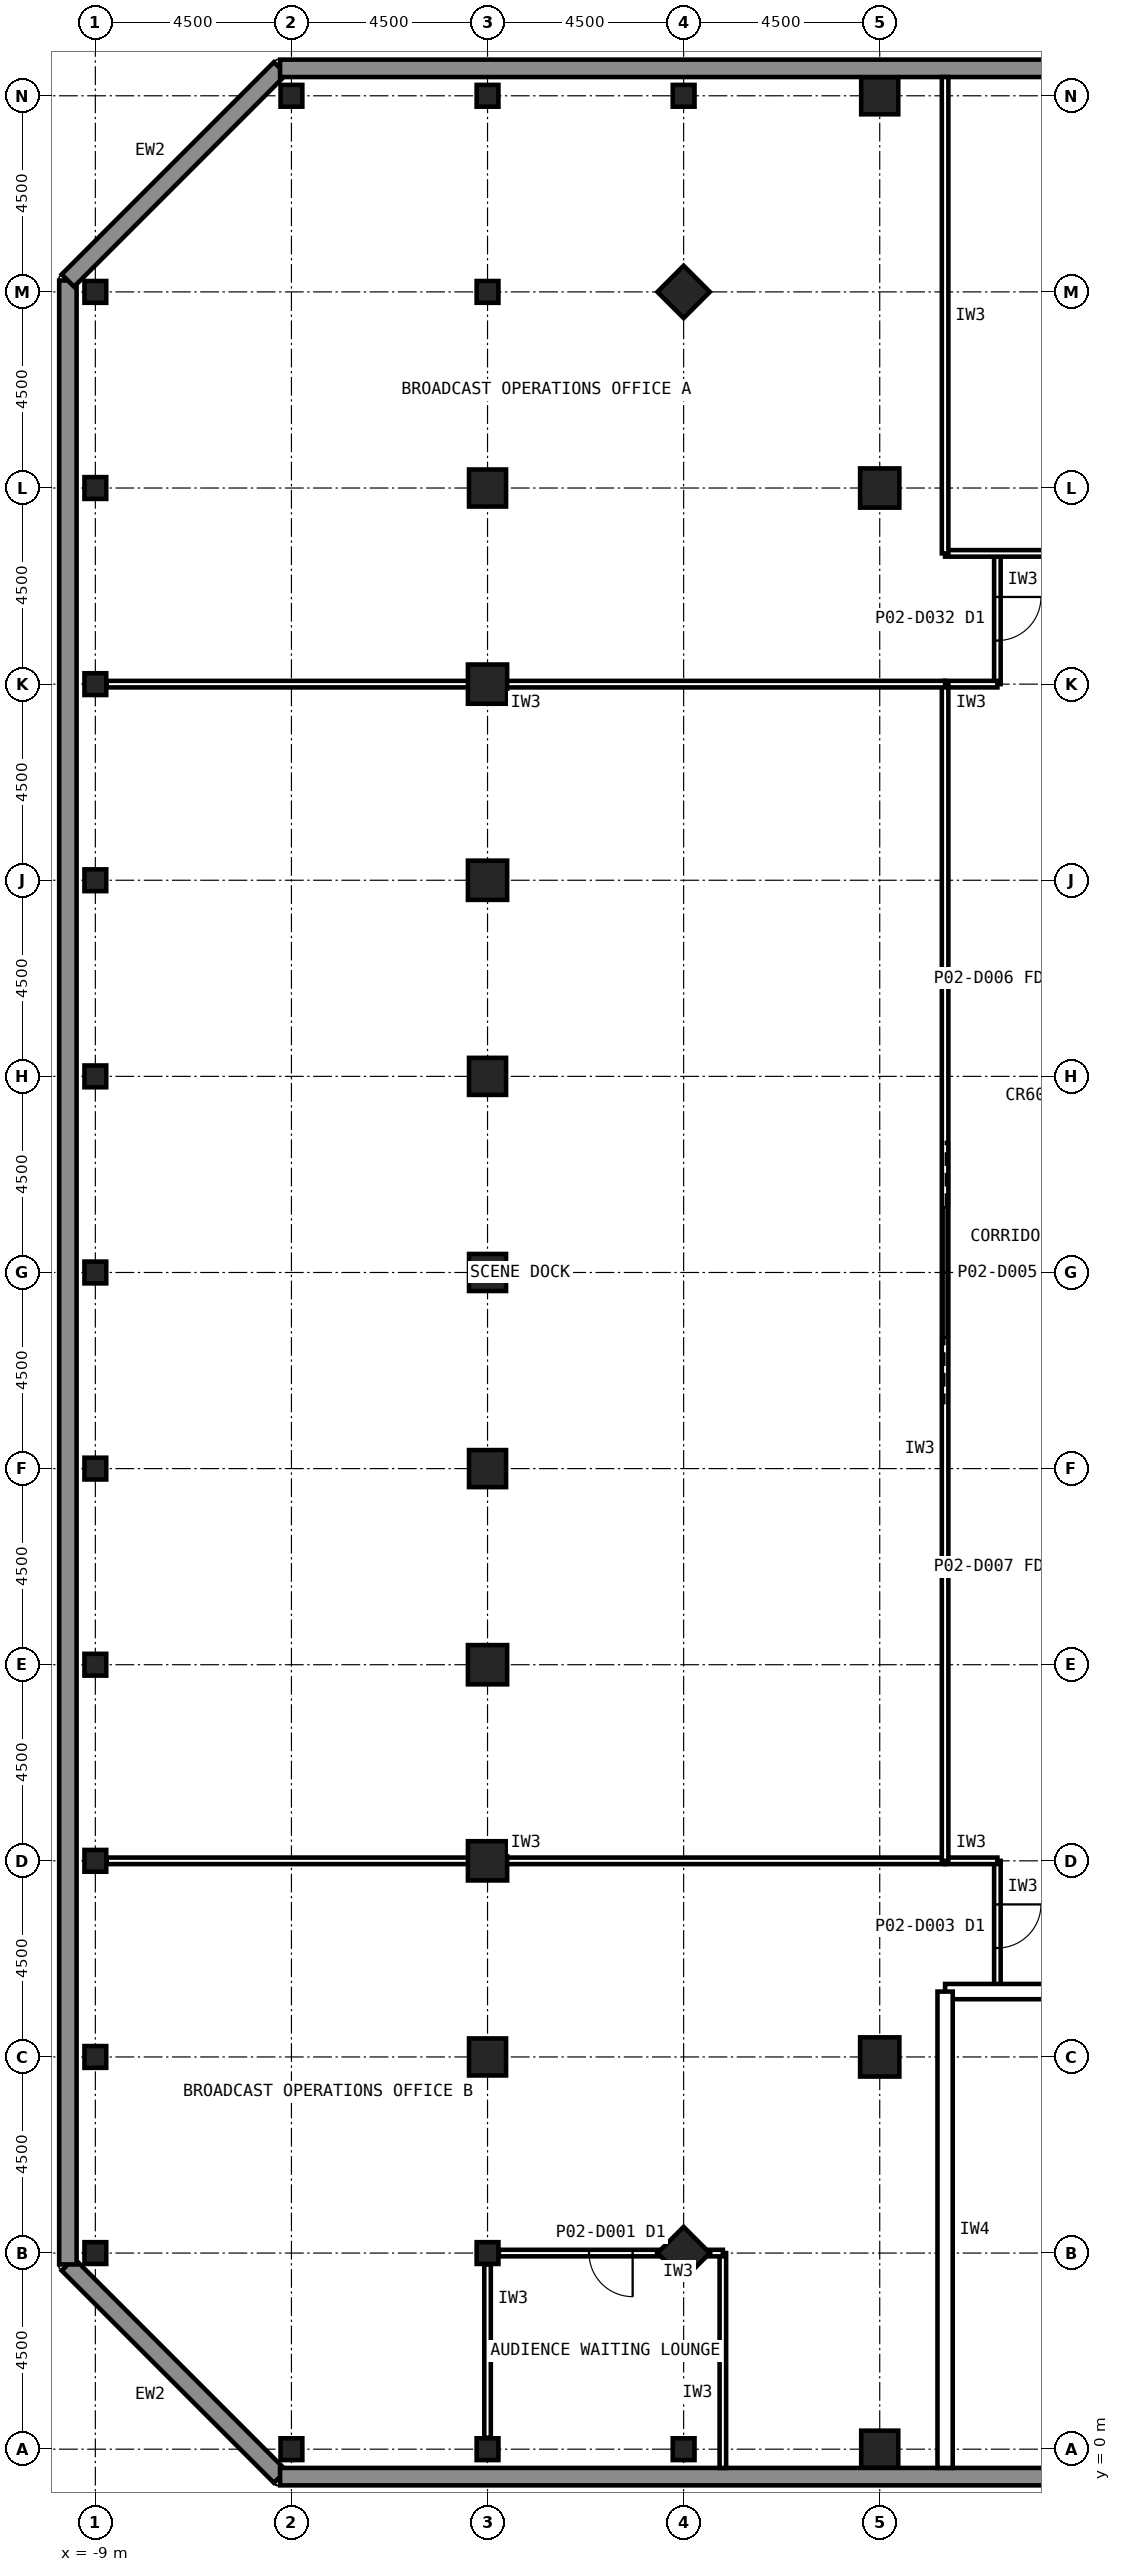
"""IFC4 building model, lengths in metres.
Left out: names, types, materials, properties, quantities, classifications, styles, units other than length and angle.
Written with IfcOpenShell. Run it as: python <this file> out.ifc"""

import sys

from ifc_helpers import new_model, si_unit, direction, frame, frame_2d, origin, origin_2d, place, context, subcontext, project, spatial, rectangle, hollow_rectangle, extrude, element, fill, save


model = new_model("IFC4")
c1 = context("Model", 3, precision=1e-05, world=origin(), true_north=direction((0.0, 1.0)))
c2 = subcontext(c1, "Body", "Model", "MODEL_VIEW")
j1 = project(units=[si_unit("LENGTHUNIT", "METRE"), si_unit("PLANEANGLEUNIT", "RADIAN")], contexts=[c1])
p1 = place(None, origin())
s1 = spatial("IfcSite", under=j1, at=p1, CompositionType="ELEMENT")
p2 = place(p1, origin())
s2 = spatial("IfcBuilding", under=s1, at=p2, CompositionType="ELEMENT")
p3 = place(p2, frame((0.0, 0.0, 6.0)))
s3 = spatial("IfcBuildingStorey", under=s2, at=p3, CompositionType="ELEMENT", Elevation=6.0)
for number, where, z_axis, x_axis in (
    (1, (9.0, 0.0, 0.0), (0.0, 0.0, 1.0), (1.0, 0.0, 0.0)),
    (2, (9.0, 54.0, 0.0), (0.0, 0.0, 1.0), (1.0, 0.0, 0.0)),
    (3, (0.0, 45.0, 0.0), (0.0, 0.0, 1.0), (1.0, 0.0, 0.0)),
):
    element("IfcColumn", number, at=place(p3, frame(where, z_axis=z_axis, x_axis=x_axis)), inside=s3, PredefinedType="COLUMN", context=c2, shape_type="SweptSolid", body=[
        extrude(hollow_rectangle(XDim=0.85, YDim=0.85, WallThickness=0.05, at=origin_2d()), origin(), (0.0, 0.0, 1.0), 6.0),
    ])
for number, where, z_axis, x_axis in (
    (4, (0.0, 40.5, 0.0), (0.0, 0.0, 1.0), (1.0, 0.0, 0.0)),
    (5, (0.0, 36.0, 0.0), (0.0, 0.0, 1.0), (1.0, 0.0, 0.0)),
):
    element("IfcColumn", number, at=place(p3, frame(where, z_axis=z_axis, x_axis=x_axis)), inside=s3, PredefinedType="COLUMN", context=c2, shape_type="SweptSolid", body=[
        extrude(hollow_rectangle(XDim=0.9, YDim=0.9, WallThickness=0.063, at=origin_2d()), origin(), (0.0, 0.0, 1.0), 6.0),
    ])
for number, where, z_axis, x_axis in (
    (6, (0.0, 31.5, 0.0), (0.0, 0.0, 1.0), (1.0, 0.0, 0.0)),
    (7, (0.0, 27.0, 0.0), (0.0, 0.0, 1.0), (1.0, 0.0, 0.0)),
    (8, (0.0, 22.5, 0.0), (0.0, 0.0, 1.0), (1.0, 0.0, 0.0)),
):
    element("IfcColumn", number, at=place(p3, frame(where, z_axis=z_axis, x_axis=x_axis)), inside=s3, PredefinedType="COLUMN", context=c2, shape_type="SweptSolid", body=[
        extrude(hollow_rectangle(XDim=0.85, YDim=0.85, WallThickness=0.05, at=origin_2d()), origin(), (0.0, 0.0, 1.0), 6.0),
    ])
for number, where, z_axis, x_axis in (
    (9, (0.0, 18.0, 0.0), (0.0, 0.0, 1.0), (1.0, 0.0, 0.0)),
    (10, (0.0, 13.5, 0.0), (0.0, 0.0, 1.0), (1.0, 0.0, 0.0)),
):
    element("IfcColumn", number, at=place(p3, frame(where, z_axis=z_axis, x_axis=x_axis)), inside=s3, PredefinedType="COLUMN", context=c2, shape_type="SweptSolid", body=[
        extrude(hollow_rectangle(XDim=0.9, YDim=0.9, WallThickness=0.063, at=origin_2d()), origin(), (0.0, 0.0, 1.0), 6.0),
    ])
for number, where, z_axis, x_axis in (
    (11, (0.0, 9.0, 0.0), (0.0, 0.0, 1.0), (1.0, 0.0, 0.0)),
    (12, (4.5, 4.5, 0.0), (0.0, 0.0, 1.0), (0.707, 0.707, 0.0)),
    (13, (4.5, 49.5, 0.0), (0.0, 0.0, 1.0), (0.707, 0.707, 0.0)),
):
    element("IfcColumn", number, at=place(p3, frame(where, z_axis=z_axis, x_axis=x_axis)), inside=s3, PredefinedType="COLUMN", context=c2, shape_type="SweptSolid", body=[
        extrude(hollow_rectangle(XDim=0.85, YDim=0.85, WallThickness=0.05, at=origin_2d()), origin(), (0.0, 0.0, 1.0), 6.0),
    ])
for number, where, z_axis, x_axis in (
    (14, (9.0, 9.0, 0.0), (0.0, 0.0, 1.0), (1.0, 0.0, 0.0)),
    (15, (9.0, 45.0, 0.0), (0.0, 0.0, 1.0), (1.0, 0.0, 0.0)),
):
    element("IfcColumn", number, at=place(p3, frame(where, z_axis=z_axis, x_axis=x_axis)), inside=s3, PredefinedType="COLUMN", context=c2, shape_type="SweptSolid", body=[
        extrude(hollow_rectangle(XDim=0.9, YDim=0.9, WallThickness=0.063, at=origin_2d()), origin(), (0.0, 0.0, 1.0), 6.0),
    ])
for number, where, z_axis, x_axis in (
    (16, (-9.0, 4.5, 0.0), (0.0, 0.0, 1.0), (1.0, 0.0, 0.0)),
    (17, (-9.0, 9.0, 0.0), (0.0, 0.0, 1.0), (1.0, 0.0, 0.0)),
    (18, (-9.0, 13.5, 0.0), (0.0, 0.0, 1.0), (1.0, 0.0, 0.0)),
    (19, (-9.0, 18.0, 0.0), (0.0, 0.0, 1.0), (1.0, 0.0, 0.0)),
    (20, (-9.0, 22.5, 0.0), (0.0, 0.0, 1.0), (1.0, 0.0, 0.0)),
    (21, (-9.0, 27.0, 0.0), (0.0, 0.0, 1.0), (1.0, 0.0, 0.0)),
    (22, (-9.0, 31.5, 0.0), (0.0, 0.0, 1.0), (1.0, 0.0, 0.0)),
    (23, (-9.0, 36.0, 0.0), (0.0, 0.0, 1.0), (1.0, 0.0, 0.0)),
    (24, (-9.0, 40.5, 0.0), (0.0, 0.0, 1.0), (1.0, 0.0, 0.0)),
    (25, (-9.0, 45.0, 0.0), (0.0, 0.0, 1.0), (1.0, 0.0, 0.0)),
    (26, (-9.0, 49.5, 0.0), (0.0, 0.0, 1.0), (1.0, 0.0, 0.0)),
    (27, (-4.5, 0.0, 0.0), (0.0, 0.0, 1.0), (1.0, 0.0, 0.0)),
    (28, (-4.5, 54.0, 0.0), (0.0, 0.0, 1.0), (1.0, 0.0, 0.0)),
    (29, (0.0, 0.0, 0.0), (0.0, 0.0, 1.0), (1.0, 0.0, 0.0)),
    (30, (4.5, 0.0, 0.0), (0.0, 0.0, 1.0), (1.0, 0.0, 0.0)),
    (31, (0.0, 4.5, 0.0), (0.0, 0.0, 1.0), (1.0, 0.0, 0.0)),
    (32, (0.0, 54.0, 0.0), (0.0, 0.0, 1.0), (1.0, 0.0, 0.0)),
    (33, (4.5, 54.0, 0.0), (0.0, 0.0, 1.0), (1.0, 0.0, 0.0)),
    (34, (0.0, 49.5, 0.0), (0.0, 0.0, 1.0), (1.0, 0.0, 0.0)),
):
    element("IfcColumn", number, at=place(p3, frame(where, z_axis=z_axis, x_axis=x_axis)), inside=s3, PredefinedType="COLUMN", context=c2, shape_type="SweptSolid", body=[
        extrude(hollow_rectangle(XDim=0.5, YDim=0.5, WallThickness=0.022, at=origin_2d()), origin(), (0.0, 0.0, 1.0), 6.0),
    ])
p4 = place(p3, frame((-4.761, -0.63, 0.0), z_axis=(0.0, 0.0, 1.0), x_axis=(-0.707106781187, 0.707106781187, 0.0)))
e35 = element("IfcWall", 35, at=p4, inside=s3, PredefinedType="SOLIDWALL", context=c2, shape_type="SweptSolid", body=[
    extrude(rectangle(XDim=6.886, YDim=0.4, at=frame_2d((3.443, 0.0))), origin(), (0.0, 0.0, 1.0), 6.0),
])
p5 = place(p3, frame((-9.63, 4.239, 0.0), z_axis=(0.0, 0.0, 1.0), x_axis=(0.0, 1.0, 0.0)))
e36 = element("IfcWall", 36, at=p5, inside=s3, PredefinedType="SOLIDWALL", context=c2, shape_type="SweptSolid", body=[
    extrude(rectangle(XDim=45.522, YDim=0.4, at=frame_2d((22.761, 0.0))), origin(), (0.0, 0.0, 1.0), 6.0),
])
p6 = place(p3, frame((-9.63, 49.761, 0.0), z_axis=(0.0, 0.0, 1.0), x_axis=(0.707106781187, 0.707106781187, 0.0)))
e37 = element("IfcWall", 37, at=p6, inside=s3, PredefinedType="SOLIDWALL", context=c2, shape_type="SweptSolid", body=[
    extrude(rectangle(XDim=6.886, YDim=0.4, at=frame_2d((3.443, 0.0))), origin(), (0.0, 0.0, 1.0), 6.0),
])
for number, where, z_axis, x_axis in (
    (38, (-4.761, 54.63, 0.0), (0.0, 0.0, 1.0), (1.0, 0.0, 0.0)),
    (39, (58.761, -0.63, 0.0), (0.0, 0.0, 1.0), (-1.0, 0.0, 0.0)),
):
    element("IfcWall", number, at=place(p3, frame(where, z_axis=z_axis, x_axis=x_axis)), inside=s3, PredefinedType="SOLIDWALL", context=c2, shape_type="SweptSolid", body=[
        extrude(rectangle(XDim=63.522, YDim=0.4, at=frame_2d((31.761, 0.0))), origin(), (0.0, 0.0, 1.0), 6.0),
    ])
p7 = place(p3, frame((11.7, 43.5, 0.0), z_axis=(0.0, 0.0, 1.0), x_axis=(0.0, -1.0, 0.0)))
e40 = element("IfcWall", 40, at=p7, inside=s3, PredefinedType="PARTITIONING", context=c2, shape_type="SweptSolid", body=[
    extrude(rectangle(XDim=3.0, YDim=0.15, at=frame_2d((1.5, 0.0))), origin(), (0.0, 0.0, 1.0), 5.8),
])
p8 = place(p7, frame((1.0, 0.0, 0.0)))
e41 = element("IfcOpeningElement", 41, at=p8, cuts=e40, PredefinedType="OPENING", context=c2, shape_type="SweptSolid", body=[
    extrude(rectangle(XDim=1.0, YDim=2.1, at=frame_2d((0.5, 1.05))), frame((0.0, 0.085, 0.0), z_axis=(0.0, -1.0, 0.0), x_axis=(1.0, 0.0, 0.0)), (0.0, 0.0, 1.0), 0.17),
])
p9 = place(p3, frame((11.7, 40.5, 0.0), z_axis=(0.0, 0.0, 1.0), x_axis=(-1.0, 0.0, 0.0)))
e42 = element("IfcWall", 42, at=p9, inside=s3, PredefinedType="PARTITIONING", context=c2, shape_type="SweptSolid", body=[
    extrude(rectangle(XDim=1.21, YDim=0.15, at=frame_2d((0.605, 0.0))), origin(), (0.0, 0.0, 1.0), 4.881),
])
p10 = place(p3, frame((11.7, 13.5, 0.0), z_axis=(0.0, 0.0, 1.0), x_axis=(0.0, -1.0, 0.0)))
e43 = element("IfcWall", 43, at=p10, inside=s3, PredefinedType="PARTITIONING", context=c2, shape_type="SweptSolid", body=[
    extrude(rectangle(XDim=3.0, YDim=0.15, at=frame_2d((1.5, 0.0))), origin(), (0.0, 0.0, 1.0), 5.8),
])
p11 = place(p10, frame((1.0, 0.0, 0.0)))
e44 = element("IfcOpeningElement", 44, at=p11, cuts=e43, PredefinedType="OPENING", context=c2, shape_type="SweptSolid", body=[
    extrude(rectangle(XDim=1.0, YDim=2.1, at=frame_2d((0.5, 1.05))), frame((0.0, 0.085, 0.0), z_axis=(0.0, -1.0, 0.0), x_axis=(1.0, 0.0, 0.0)), (0.0, 0.0, 1.0), 0.17),
])
p12 = place(p3, frame((10.49, 13.5, 0.0), z_axis=(0.0, 0.0, 1.0), x_axis=(1.0, 0.0, 0.0)))
e45 = element("IfcWall", 45, at=p12, inside=s3, PredefinedType="PARTITIONING", context=c2, shape_type="SweptSolid", body=[
    extrude(rectangle(XDim=1.21, YDim=0.15, at=frame_2d((0.605, 0.0))), origin(), (0.0, 0.0, 1.0), 4.881),
])
p13 = place(p3, frame((43.5, 10.5, 0.0), z_axis=(0.0, 0.0, 1.0), x_axis=(-1.0, 0.0, 0.0)))
e46 = element("IfcWall", 46, at=p13, inside=s3, PredefinedType="PARTITIONING", context=c2, shape_type="SweptSolid", body=[
    extrude(rectangle(XDim=33.0, YDim=0.35, at=frame_2d((16.5, 0.0))), origin(), (0.0, 0.0, 1.0), 5.8),
])
p14 = place(p13, frame((15.3, 0.0, 0.0)))
e47 = element("IfcOpeningElement", 47, at=p14, cuts=e46, PredefinedType="OPENING", context=c2, shape_type="SweptSolid", body=[
    extrude(rectangle(XDim=2.4, YDim=3.0, at=frame_2d((1.2, 1.5))), frame((0.0, 0.185, 0.0), z_axis=(0.0, -1.0, 0.0), x_axis=(1.0, 0.0, 0.0)), (0.0, 0.0, 1.0), 0.37),
])
p15 = place(p3, frame((10.5, 10.5, 0.0), z_axis=(0.0, 0.0, 1.0), x_axis=(0.0, -1.0, 0.0)))
e48 = element("IfcWall", 48, at=p15, inside=s3, PredefinedType="PARTITIONING", context=c2, shape_type="SweptSolid", body=[
    extrude(rectangle(XDim=10.93, YDim=0.35, at=frame_2d((5.465, 0.0))), origin(), (0.0, 0.0, 1.0), 5.8),
])
p16 = place(p3, frame((10.5, 43.5, 0.0), z_axis=(0.0, 0.0, 1.0), x_axis=(1.0, 0.0, 0.0)))
e49 = element("IfcWall", 49, at=p16, inside=s3, PredefinedType="PARTITIONING", context=c2, shape_type="SweptSolid", body=[
    extrude(rectangle(XDim=33.0, YDim=0.15, at=frame_2d((16.5, 0.0))), origin(), (0.0, 0.0, 1.0), 5.8),
])
p17 = place(p16, frame((16.0, 0.0, 0.0)))
e50 = element("IfcOpeningElement", 50, at=p17, cuts=e49, PredefinedType="OPENING", context=c2, shape_type="SweptSolid", body=[
    extrude(rectangle(XDim=1.0, YDim=2.1, at=frame_2d((0.5, 1.05))), frame((0.0, 0.085, 0.0), z_axis=(0.0, -1.0, 0.0), x_axis=(1.0, 0.0, 0.0)), (0.0, 0.0, 1.0), 0.17),
])
p18 = place(p3, frame((10.5, 54.43, 0.0), z_axis=(0.0, 0.0, 1.0), x_axis=(0.0, -1.0, 0.0)))
e51 = element("IfcWall", 51, at=p18, inside=s3, PredefinedType="PARTITIONING", context=c2, shape_type="SweptSolid", body=[
    extrude(rectangle(XDim=10.93, YDim=0.15, at=frame_2d((5.465, 0.0))), origin(), (0.0, 0.0, 1.0), 5.8),
])
p19 = place(p3, frame((-8.74, 13.5, 0.0), z_axis=(0.0, 0.0, 1.0), x_axis=(1.0, 0.0, 0.0)))
e52 = element("IfcWall", 52, at=p19, inside=s3, PredefinedType="PARTITIONING", context=c2, shape_type="SweptSolid", body=[
    extrude(rectangle(XDim=19.24, YDim=0.15, at=frame_2d((9.62, 0.0))), origin(), (0.0, 0.0, 1.0), 4.881),
])
p20 = place(p3, frame((10.5, 13.5, 0.0), z_axis=(0.0, 0.0, 1.0), x_axis=(0.0, 1.0, 0.0)))
e53 = element("IfcWall", 53, at=p20, inside=s3, PredefinedType="PARTITIONING", context=c2, shape_type="SweptSolid", body=[
    extrude(rectangle(XDim=27.0, YDim=0.15, at=frame_2d((13.5, 0.0))), origin(), (0.0, 0.0, 1.0), 5.8),
])
p21 = place(p20, frame((12.0, 0.0, 0.0)))
e54 = element("IfcOpeningElement", 54, at=p21, cuts=e53, PredefinedType="OPENING", context=c2, shape_type="SweptSolid", body=[
    extrude(rectangle(XDim=3.0, YDim=4.0, at=frame_2d((1.5, 2.0))), frame((0.0, 0.085, 0.0), z_axis=(0.0, -1.0, 0.0), x_axis=(1.0, 0.0, 0.0)), (0.0, 0.0, 1.0), 0.17),
])
p22 = place(p3, frame((10.5, 40.5, 0.0), z_axis=(0.0, 0.0, 1.0), x_axis=(-1.0, 0.0, 0.0)))
e55 = element("IfcWall", 55, at=p22, inside=s3, PredefinedType="PARTITIONING", context=c2, shape_type="SweptSolid", body=[
    extrude(rectangle(XDim=19.24, YDim=0.15, at=frame_2d((9.62, 0.0))), origin(), (0.0, 0.0, 1.0), 4.881),
])
p23 = place(p3, frame((5.4, -0.43, 0.0), z_axis=(0.0, 0.0, 1.0), x_axis=(0.0, 1.0, 0.0)))
e56 = element("IfcWall", 56, at=p23, inside=s3, PredefinedType="PARTITIONING", context=c2, shape_type="SweptSolid", body=[
    extrude(rectangle(XDim=4.93, YDim=0.15, at=frame_2d((2.465, 0.0))), origin(), (0.0, 0.0, 1.0), 5.8),
])
p24 = place(p3, frame((5.4, 4.5, 0.0), z_axis=(0.0, 0.0, 1.0), x_axis=(-1.0, 0.0, 0.0)))
e57 = element("IfcWall", 57, at=p24, inside=s3, PredefinedType="PARTITIONING", context=c2, shape_type="SweptSolid", body=[
    extrude(rectangle(XDim=5.14, YDim=0.15, at=frame_2d((2.57, 0.0))), origin(), (0.0, 0.0, 1.0), 5.189),
])
p25 = place(p24, frame((2.07, 0.0, 0.0)))
e58 = element("IfcOpeningElement", 58, at=p25, cuts=e57, PredefinedType="OPENING", context=c2, shape_type="SweptSolid", body=[
    extrude(rectangle(XDim=1.0, YDim=2.1, at=frame_2d((0.5, 1.05))), frame((0.0, 0.085, 0.0), z_axis=(0.0, -1.0, 0.0), x_axis=(1.0, 0.0, 0.0)), (0.0, 0.0, 1.0), 0.17),
])
p26 = place(p3, frame((0.0, 4.24, 0.0), z_axis=(0.0, 0.0, 1.0), x_axis=(0.0, -1.0, 0.0)))
e59 = element("IfcWall", 59, at=p26, inside=s3, PredefinedType="PARTITIONING", context=c2, shape_type="SweptSolid", body=[
    extrude(rectangle(XDim=3.98, YDim=0.15, at=frame_2d((1.99, 0.0))), origin(), (0.0, 0.0, 1.0), 5.189),
])
p27 = place(p8, origin())
e60 = element("IfcDoor", 60, at=p27, inside=s3, OperationType="SINGLE_SWING_LEFT", PredefinedType="DOOR", context=c2, shape_type="SweptSolid", body=[
    extrude(rectangle(XDim=1.0, YDim=2.1, at=frame_2d((0.5, 1.05))), frame((0.0, 0.025, 0.0), z_axis=(0.0, -1.0, 0.0), x_axis=(1.0, 0.0, 0.0)), (0.0, 0.0, 1.0), 0.05),
])
fill(e41, e60)
p28 = place(p11, origin())
e61 = element("IfcDoor", 61, at=p28, inside=s3, OperationType="SINGLE_SWING_LEFT", PredefinedType="DOOR", context=c2, shape_type="SweptSolid", body=[
    extrude(rectangle(XDim=1.0, YDim=2.1, at=frame_2d((0.5, 1.05))), frame((0.0, 0.025, 0.0), z_axis=(0.0, -1.0, 0.0), x_axis=(1.0, 0.0, 0.0)), (0.0, 0.0, 1.0), 0.05),
])
fill(e44, e61)
p29 = place(p21, origin())
e62 = element("IfcDoor", 62, at=p29, inside=s3, OperationType="SINGLE_SWING_LEFT", PredefinedType="DOOR", context=c2, shape_type="SweptSolid", body=[
    extrude(rectangle(XDim=3.0, YDim=4.0, at=frame_2d((1.5, 2.0))), frame((0.0, 0.025, 0.0), z_axis=(0.0, -1.0, 0.0), x_axis=(1.0, 0.0, 0.0)), (0.0, 0.0, 1.0), 0.05),
])
fill(e54, e62)
p30 = place(p25, origin())
e63 = element("IfcDoor", 63, at=p30, inside=s3, OperationType="SINGLE_SWING_LEFT", PredefinedType="DOOR", context=c2, shape_type="SweptSolid", body=[
    extrude(rectangle(XDim=1.0, YDim=2.1, at=frame_2d((0.5, 1.05))), frame((0.0, 0.025, 0.0), z_axis=(0.0, -1.0, 0.0), x_axis=(1.0, 0.0, 0.0)), (0.0, 0.0, 1.0), 0.05),
])
fill(e58, e63)
save(model, sys.argv[1])
